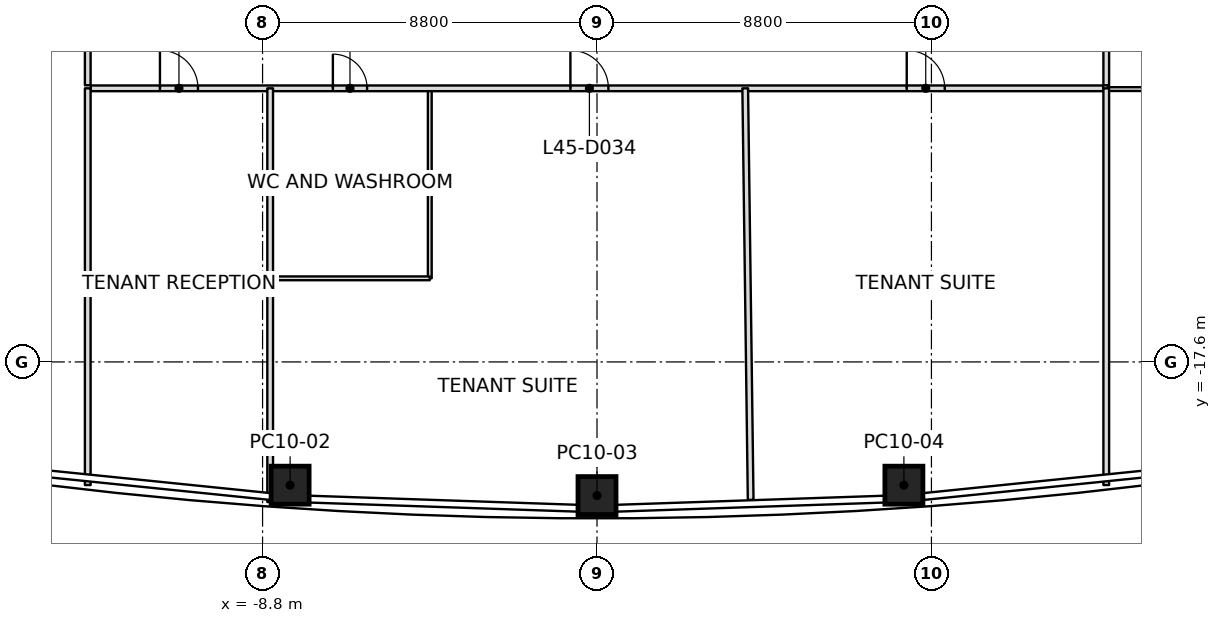
"""IFC4 building model, lengths in metres.
Left out: names, types, materials, properties, quantities, classifications, styles, units other than length and angle.
Written with IfcOpenShell. Run it as: python <this file> out.ifc"""

import sys

from ifc_helpers import new_model, si_unit, direction, frame, frame_2d, origin, origin_2d, place, context, subcontext, project, spatial, rectangle, extrude, element, fill, save


model = new_model("IFC4")
c1 = context("Model", 3, precision=1e-05, world=origin(), true_north=direction((0.0, 1.0)))
c2 = subcontext(c1, "Body", "Model", "MODEL_VIEW")
j1 = project(units=[si_unit("LENGTHUNIT", "METRE"), si_unit("PLANEANGLEUNIT", "RADIAN")], contexts=[c1])
p1 = place(None, origin())
s1 = spatial("IfcSite", under=j1, at=p1, CompositionType="ELEMENT")
p2 = place(p1, origin())
s2 = spatial("IfcBuilding", under=s1, at=p2, CompositionType="ELEMENT")
p3 = place(p2, frame((0.0, 0.0, 201.8)))
s3 = spatial("IfcBuildingStorey", under=s2, at=p3, CompositionType="ELEMENT", Elevation=201.8)
p4 = place(p3, frame((-8.075, -20.843, 0.0), z_axis=(0.008788174922, 0.01116830563, 0.999899013366), x_axis=(-0.997660565826, 0.067891326384, 0.008010193405)))
e1 = element("IfcColumn", 1, at=p4, inside=s3, PredefinedType="COLUMN", context=c2, shape_type="SweptSolid", body=[
    extrude(rectangle(XDim=1.0, YDim=1.0, at=origin_2d()), origin(), (0.0, 0.0, 1.0), 4.0),
])
p5 = place(p3, frame((0.0, -21.117, 0.0), z_axis=(0.0, 0.011473854038, 0.99993417317), x_axis=(1.0, 0.0, 0.0)))
e2 = element("IfcColumn", 2, at=p5, inside=s3, PredefinedType="COLUMN", context=c2, shape_type="SweptSolid", body=[
    extrude(rectangle(XDim=1.0, YDim=1.0, at=origin_2d()), origin(), (0.0, 0.0, 1.0), 4.0),
])
p6 = place(p3, frame((8.075, -20.843, 0.0), z_axis=(-0.008788174922, 0.01116830563, 0.999899013366), x_axis=(0.997660565826, 0.067891326384, 0.008010193405)))
e3 = element("IfcColumn", 3, at=p6, inside=s3, PredefinedType="COLUMN", context=c2, shape_type="SweptSolid", body=[
    extrude(rectangle(XDim=1.0, YDim=1.0, at=origin_2d()), origin(), (0.0, 0.0, 1.0), 4.0),
])
p7 = place(p3, frame((-13.4, -10.4, 0.0), z_axis=(0.0, 0.0, 1.0), x_axis=(0.0, -1.0, 0.0)))
e4 = element("IfcWall", 4, at=p7, inside=s3, PredefinedType="PARTITIONING", context=c2, shape_type="SweptSolid", body=[
    extrude(rectangle(XDim=10.44, YDim=0.15, at=frame_2d((5.22, 0.0))), origin(), (0.0, 0.0, 1.0), 3.084),
])
p8 = place(p3, frame((-8.6, -10.4, 0.0), z_axis=(0.0, 0.0, 1.0), x_axis=(0.0, -1.0, 0.0)))
e5 = element("IfcWall", 5, at=p8, inside=s3, PredefinedType="PARTITIONING", context=c2, shape_type="SweptSolid", body=[
    extrude(rectangle(XDim=10.886, YDim=0.15, at=frame_2d((5.443, 0.0))), origin(), (0.0, 0.0, 1.0), 3.084),
])
p9 = place(p3, frame((3.9, -10.4, 0.0), z_axis=(0.0, 0.0, 1.0), x_axis=(0.013254020537, -0.999912161612, 0.0)))
e6 = element("IfcWall", 6, at=p9, inside=s3, PredefinedType="PARTITIONING", context=c2, shape_type="SweptSolid", body=[
    extrude(rectangle(XDim=10.831, YDim=0.15, at=frame_2d((5.416, 0.0))), origin(), (0.0, 0.0, 1.0), 3.234),
])
p10 = place(p3, frame((13.4, -10.4, 0.0), z_axis=(0.0, 0.0, 1.0), x_axis=(0.0, -1.0, 0.0)))
e7 = element("IfcWall", 7, at=p10, inside=s3, PredefinedType="PARTITIONING", context=c2, shape_type="SweptSolid", body=[
    extrude(rectangle(XDim=10.44, YDim=0.15, at=frame_2d((5.22, 0.0))), origin(), (0.0, 0.0, 1.0), 3.234),
])
p11 = place(p3, frame((-13.4, 10.32, 0.0), z_axis=(0.0, 0.0, 1.0), x_axis=(0.0, -1.0, 0.0)))
e8 = element("IfcWall", 8, at=p11, inside=s3, PredefinedType="PARTITIONING", context=c2, shape_type="SweptSolid", body=[
    extrude(rectangle(XDim=20.64, YDim=0.15, at=frame_2d((10.32, 0.0))), origin(), (0.0, 0.0, 1.0), 3.097),
])
p12 = place(p11, frame((2.32, 0.0, 0.0)))
e9 = element("IfcOpeningElement", 9, at=p12, cuts=e8, PredefinedType="OPENING", context=c2, shape_type="SweptSolid", body=[
    extrude(rectangle(XDim=1.0, YDim=2.1, at=frame_2d((0.5, 1.05))), frame((0.0, 0.075, 0.0), z_axis=(0.0, -1.0, 0.0), x_axis=(1.0, 0.0, 0.0)), (0.0, 0.0, 1.0), 0.15),
])
p13 = place(p11, frame((7.77, 0.0, 0.0)))
e10 = element("IfcOpeningElement", 10, at=p13, cuts=e8, PredefinedType="OPENING", context=c2, shape_type="SweptSolid", body=[
    extrude(rectangle(XDim=0.9, YDim=2.1, at=frame_2d((0.45, 1.05))), frame((0.0, 0.075, 0.0), z_axis=(0.0, -1.0, 0.0), x_axis=(1.0, 0.0, 0.0)), (0.0, 0.0, 1.0), 0.15),
])
p14 = place(p11, frame((15.28, 0.0, 0.0)))
e11 = element("IfcOpeningElement", 11, at=p14, cuts=e8, PredefinedType="OPENING", context=c2, shape_type="SweptSolid", body=[
    extrude(rectangle(XDim=1.0, YDim=2.1, at=frame_2d((0.5, 1.05))), frame((0.0, 0.075, 0.0), z_axis=(0.0, -1.0, 0.0), x_axis=(1.0, 0.0, 0.0)), (0.0, 0.0, 1.0), 0.15),
])
p15 = place(p3, frame((-13.32, -10.4, 0.0), z_axis=(0.0, 0.0, 1.0), x_axis=(1.0, 0.0, 0.0)))
e12 = element("IfcWall", 12, at=p15, inside=s3, PredefinedType="PARTITIONING", context=c2, shape_type="SweptSolid", body=[
    extrude(rectangle(XDim=26.64, YDim=0.15, at=frame_2d((13.32, 0.0))), origin(), (0.0, 0.0, 1.0), 3.167),
])
p16 = place(p15, frame((1.82, 0.0, 0.0)))
e13 = element("IfcOpeningElement", 13, at=p16, cuts=e12, PredefinedType="OPENING", context=c2, shape_type="SweptSolid", body=[
    extrude(rectangle(XDim=1.0, YDim=2.1, at=frame_2d((0.5, 1.05))), frame((0.0, 0.075, 0.0), z_axis=(0.0, -1.0, 0.0), x_axis=(1.0, 0.0, 0.0)), (0.0, 0.0, 1.0), 0.15),
])
p17 = place(p15, frame((6.37, 0.0, 0.0)))
e14 = element("IfcOpeningElement", 14, at=p17, cuts=e12, PredefinedType="OPENING", context=c2, shape_type="SweptSolid", body=[
    extrude(rectangle(XDim=0.9, YDim=2.1, at=frame_2d((0.45, 1.05))), frame((0.0, 0.075, 0.0), z_axis=(0.0, -1.0, 0.0), x_axis=(1.0, 0.0, 0.0)), (0.0, 0.0, 1.0), 0.15),
])
p18 = place(p15, frame((12.62, 0.0, 0.0)))
e15 = element("IfcOpeningElement", 15, at=p18, cuts=e12, PredefinedType="OPENING", context=c2, shape_type="SweptSolid", body=[
    extrude(rectangle(XDim=1.0, YDim=2.1, at=frame_2d((0.5, 1.05))), frame((0.0, 0.075, 0.0), z_axis=(0.0, -1.0, 0.0), x_axis=(1.0, 0.0, 0.0)), (0.0, 0.0, 1.0), 0.15),
])
p19 = place(p15, frame((21.47, 0.0, 0.0)))
e16 = element("IfcOpeningElement", 16, at=p19, cuts=e12, PredefinedType="OPENING", context=c2, shape_type="SweptSolid", body=[
    extrude(rectangle(XDim=1.0, YDim=2.1, at=frame_2d((0.5, 1.05))), frame((0.0, 0.075, 0.0), z_axis=(0.0, -1.0, 0.0), x_axis=(1.0, 0.0, 0.0)), (0.0, 0.0, 1.0), 0.15),
])
p20 = place(p3, frame((13.4, -10.32, 0.0), z_axis=(0.0, 0.0, 1.0), x_axis=(0.0, 1.0, 0.0)))
e17 = element("IfcWall", 17, at=p20, inside=s3, PredefinedType="PARTITIONING", context=c2, shape_type="SweptSolid", body=[
    extrude(rectangle(XDim=20.64, YDim=0.15, at=frame_2d((10.32, 0.0))), origin(), (0.0, 0.0, 1.0), 3.166),
])
p21 = place(p20, frame((15.47, 0.0, 0.0)))
e18 = element("IfcOpeningElement", 18, at=p21, cuts=e17, PredefinedType="OPENING", context=c2, shape_type="SweptSolid", body=[
    extrude(rectangle(XDim=1.0, YDim=2.1, at=frame_2d((0.5, 1.05))), frame((0.0, 0.075, 0.0), z_axis=(0.0, -1.0, 0.0), x_axis=(1.0, 0.0, 0.0)), (0.0, 0.0, 1.0), 0.15),
])
p22 = place(p20, frame((1.95, 0.0, 0.0)))
e19 = element("IfcOpeningElement", 19, at=p22, cuts=e17, PredefinedType="OPENING", context=c2, shape_type="SweptSolid", body=[
    extrude(rectangle(XDim=0.9, YDim=2.1, at=frame_2d((0.45, 1.05))), frame((0.0, 0.075, 0.0), z_axis=(0.0, -1.0, 0.0), x_axis=(1.0, 0.0, 0.0)), (0.0, 0.0, 1.0), 0.15),
])
p23 = place(p20, frame((7.61, 0.0, 0.0)))
e20 = element("IfcOpeningElement", 20, at=p23, cuts=e17, PredefinedType="OPENING", context=c2, shape_type="SweptSolid", body=[
    extrude(rectangle(XDim=1.0, YDim=2.1, at=frame_2d((0.5, 1.05))), frame((0.0, 0.075, 0.0), z_axis=(0.0, -1.0, 0.0), x_axis=(1.0, 0.0, 0.0)), (0.0, 0.0, 1.0), 0.15),
])
p24 = place(p3, frame((-4.4, -10.43, 0.0), z_axis=(0.0, 0.0, 1.0), x_axis=(0.0, -1.0, 0.0)))
e21 = element("IfcWall", 21, at=p24, inside=s3, PredefinedType="PARTITIONING", context=c2, shape_type="SweptSolid", body=[
    extrude(rectangle(XDim=4.97, YDim=0.1, at=frame_2d((2.485, 0.0))), origin(), (0.0, 0.0, 1.0), 3.3),
])
p25 = place(p3, frame((-4.4, -15.4, 0.0), z_axis=(0.0, 0.0, 1.0), x_axis=(-1.0, 0.0, 0.0)))
e22 = element("IfcWall", 22, at=p25, inside=s3, PredefinedType="PARTITIONING", context=c2, shape_type="SweptSolid", body=[
    extrude(rectangle(XDim=4.17, YDim=0.1, at=frame_2d((2.085, 0.0))), origin(), (0.0, 0.0, 1.0), 3.167),
])
p26 = place(p3, frame((19.4, -10.42, 0.0), z_axis=(0.0, 0.0, 1.0), x_axis=(-1.0, 0.0, 0.0)))
e23 = element("IfcWall", 23, at=p26, inside=s3, PredefinedType="PARTITIONING", context=c2, shape_type="SweptSolid", body=[
    extrude(rectangle(XDim=5.97, YDim=0.1, at=frame_2d((2.985, 0.0))), origin(), (0.0, 0.0, 1.0), 3.166),
])
p27 = place(p16, origin())
e24 = element("IfcDoor", 24, at=p27, inside=s3, OperationType="SINGLE_SWING_RIGHT", PredefinedType="DOOR", context=c2, shape_type="SweptSolid", body=[
    extrude(rectangle(XDim=1.0, YDim=2.1, at=frame_2d((0.5, 1.05))), frame((0.0, 0.025, 0.0), z_axis=(0.0, -1.0, 0.0), x_axis=(1.0, 0.0, 0.0)), (0.0, 0.0, 1.0), 0.05),
])
fill(e13, e24)
p28 = place(p17, origin())
e25 = element("IfcDoor", 25, at=p28, inside=s3, OperationType="SINGLE_SWING_LEFT", PredefinedType="DOOR", context=c2, shape_type="SweptSolid", body=[
    extrude(rectangle(XDim=0.9, YDim=2.1, at=frame_2d((0.45, 1.05))), frame((0.0, 0.025, 0.0), z_axis=(0.0, -1.0, 0.0), x_axis=(1.0, 0.0, 0.0)), (0.0, 0.0, 1.0), 0.05),
])
fill(e14, e25)
p29 = place(p18, origin())
e26 = element("IfcDoor", 26, at=p29, inside=s3, OperationType="SINGLE_SWING_LEFT", PredefinedType="DOOR", context=c2, shape_type="SweptSolid", body=[
    extrude(rectangle(XDim=1.0, YDim=2.1, at=frame_2d((0.5, 1.05))), frame((0.0, 0.025, 0.0), z_axis=(0.0, -1.0, 0.0), x_axis=(1.0, 0.0, 0.0)), (0.0, 0.0, 1.0), 0.05),
])
fill(e15, e26)
p30 = place(p19, origin())
e27 = element("IfcDoor", 27, at=p30, inside=s3, OperationType="SINGLE_SWING_RIGHT", PredefinedType="DOOR", context=c2, shape_type="SweptSolid", body=[
    extrude(rectangle(XDim=1.0, YDim=2.1, at=frame_2d((0.5, 1.05))), frame((0.0, 0.025, 0.0), z_axis=(0.0, -1.0, 0.0), x_axis=(1.0, 0.0, 0.0)), (0.0, 0.0, 1.0), 0.05),
])
fill(e16, e27)
save(model, sys.argv[1])
